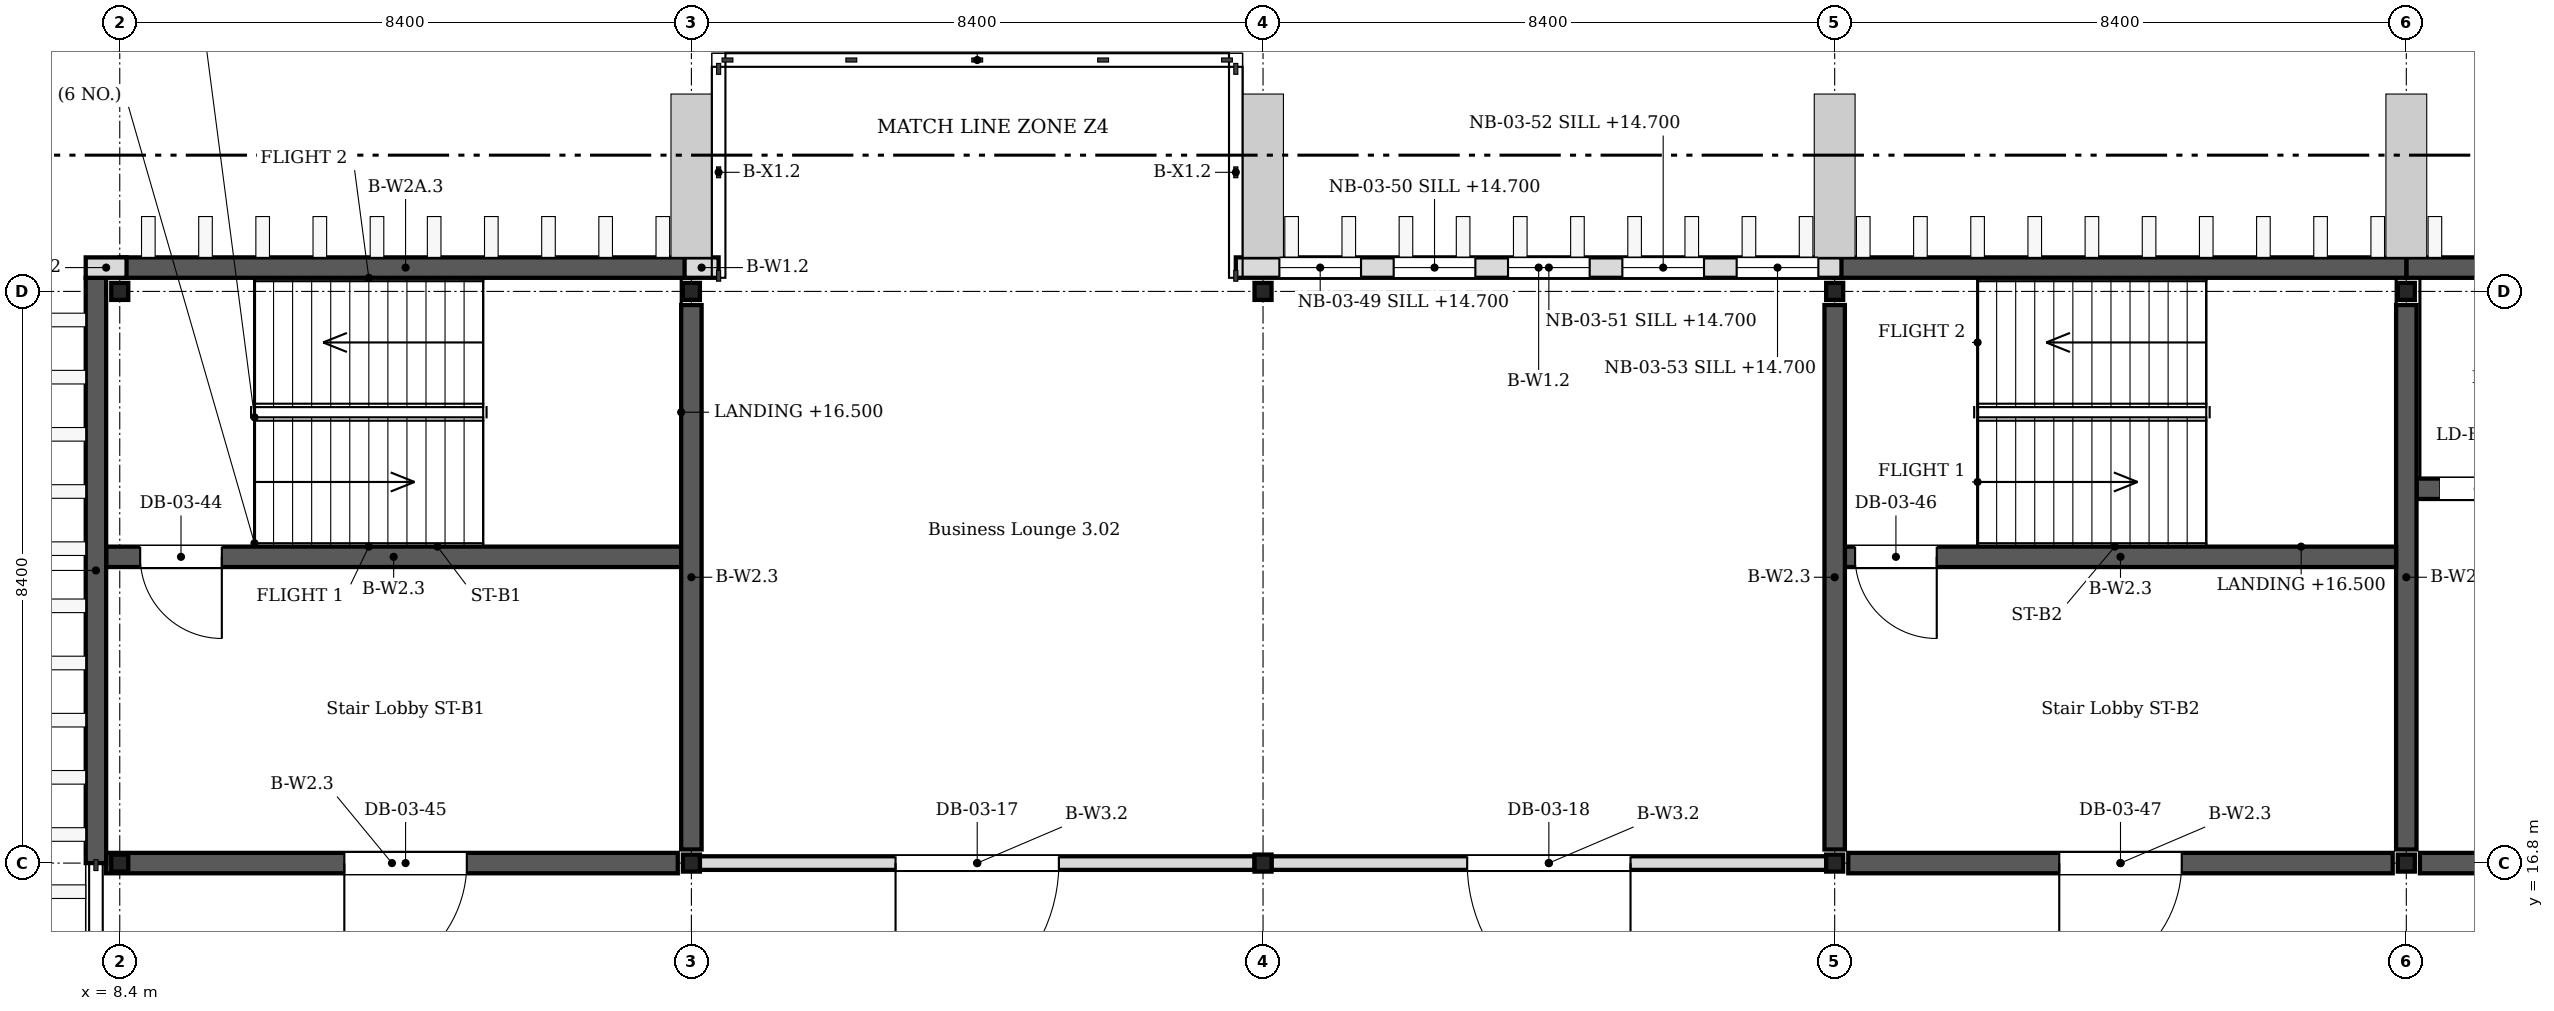
"""IFC4 building model, lengths in metres.
Left out: names, types, materials, properties, quantities, classifications, styles, units other than length and angle.
Written with IfcOpenShell. Run it as: python <this file> out.ifc"""

import sys

from ifc_helpers import new_model, si_unit, direction, frame, frame_2d, origin, origin_2d, place, context, subcontext, project, spatial, rectangle, i_section, extrude, element, fill, save


model = new_model("IFC4")
c1 = context("Model", 3, precision=1e-05, world=origin(), true_north=direction((0.0, 1.0)))
c2 = subcontext(c1, "Body", "Model", "MODEL_VIEW")
j1 = project(units=[si_unit("LENGTHUNIT", "METRE"), si_unit("PLANEANGLEUNIT", "RADIAN")], contexts=[c1])
p1 = place(None, origin())
s1 = spatial("IfcSite", under=j1, at=p1, CompositionType="ELEMENT")
p2 = place(p1, origin())
s2 = spatial("IfcBuilding", under=s1, at=p2, CompositionType="ELEMENT")
p3 = place(p2, frame((0.0, 0.0, 14.4)))
s3 = spatial("IfcBuildingStorey", under=s2, at=p3, CompositionType="ELEMENT", Elevation=14.4)
for number, where, z_axis, x_axis in (
    (1, (8.4, 16.8, 0.0), (0.0, 0.0, 1.0), (1.0, 0.0, 0.0)),
    (2, (8.4, 25.2, 0.0), (0.0, 0.0, 1.0), (1.0, 0.0, 0.0)),
    (3, (16.8, 16.8, 0.0), (0.0, 0.0, 1.0), (1.0, 0.0, 0.0)),
    (4, (16.8, 25.2, 0.0), (0.0, 0.0, 1.0), (1.0, 0.0, 0.0)),
    (5, (25.2, 16.8, 0.0), (0.0, 0.0, 1.0), (1.0, 0.0, 0.0)),
    (6, (25.2, 25.2, 0.0), (0.0, 0.0, 1.0), (1.0, 0.0, 0.0)),
    (7, (33.6, 16.8, 0.0), (0.0, 0.0, 1.0), (1.0, 0.0, 0.0)),
    (8, (33.6, 25.2, 0.0), (0.0, 0.0, 1.0), (1.0, 0.0, 0.0)),
    (9, (42.0, 16.8, 0.0), (0.0, 0.0, 1.0), (1.0, 0.0, 0.0)),
    (10, (42.0, 25.2, 0.0), (0.0, 0.0, 1.0), (1.0, 0.0, 0.0)),
):
    element("IfcColumn", number, at=place(p3, frame(where, z_axis=z_axis, x_axis=x_axis)), inside=s3, PredefinedType="COLUMN", context=c2, shape_type="SweptSolid", body=[
        extrude(i_section(OverallWidth=0.25, OverallDepth=0.25, WebThickness=0.009, FlangeThickness=0.014, FilletRadius=0.013, at=origin_2d()), origin(), (0.0, 0.0, 1.0), 3.95),
    ])
p4 = place(p3, frame((42.0, 17.0, 0.0), z_axis=(0.0, 0.0, 1.0), x_axis=(0.0, 1.0, 0.0)))
e11 = element("IfcWall", 11, at=p4, inside=s3, PredefinedType="SHEAR", context=c2, shape_type="SweptSolid", body=[
    extrude(rectangle(XDim=8.0, YDim=0.3, at=frame_2d((4.0, 0.0))), origin(), (0.0, 0.0, 1.0), 3.95),
])
p5 = place(p3, frame((42.2, 16.8, 0.0), z_axis=(0.0, 0.0, 1.0), x_axis=(1.0, 0.0, 0.0)))
e12 = element("IfcWall", 12, at=p5, inside=s3, PredefinedType="SHEAR", context=c2, shape_type="SweptSolid", body=[
    extrude(rectangle(XDim=8.0, YDim=0.3, at=frame_2d((4.0, 0.0))), origin(), (0.0, 0.0, 1.0), 3.95),
])
p6 = place(p5, frame((3.1, 0.0, 0.0)))
e13 = element("IfcOpeningElement", 13, at=p6, cuts=e12, PredefinedType="OPENING", context=c2, shape_type="SweptSolid", body=[
    extrude(rectangle(XDim=1.8, YDim=2.1, at=frame_2d((0.9, 1.05))), frame((0.0, 0.16, 0.0), z_axis=(0.0, -1.0, 0.0), x_axis=(1.0, 0.0, 0.0)), (0.0, 0.0, 1.0), 0.32),
])
p7 = place(p3, frame((42.15, 22.3, 0.0), z_axis=(0.0, 0.0, 1.0), x_axis=(1.0, 0.0, 0.0)))
e14 = element("IfcWall", 14, at=p7, inside=s3, PredefinedType="SHEAR", context=c2, shape_type="SweptSolid", body=[
    extrude(rectangle(XDim=8.1, YDim=0.3, at=frame_2d((4.05, 0.0))), origin(), (0.0, 0.0, 1.0), 3.95),
])
p8 = place(p7, frame((0.35, 0.0, 0.0)))
e15 = element("IfcOpeningElement", 15, at=p8, cuts=e14, PredefinedType="OPENING", context=c2, shape_type="SweptSolid", body=[
    extrude(rectangle(XDim=1.1, YDim=2.2, at=frame_2d((0.55, 1.1))), frame((0.0, 0.16, 0.0), z_axis=(0.0, -1.0, 0.0), x_axis=(1.0, 0.0, 0.0)), (0.0, 0.0, 1.0), 0.32),
])
p9 = place(p7, frame((6.65, 0.0, 0.0)))
e16 = element("IfcOpeningElement", 16, at=p9, cuts=e14, PredefinedType="OPENING", context=c2, shape_type="SweptSolid", body=[
    extrude(rectangle(XDim=1.1, YDim=2.2, at=frame_2d((0.55, 1.1))), frame((0.0, 0.16, 0.0), z_axis=(0.0, -1.0, 0.0), x_axis=(1.0, 0.0, 0.0)), (0.0, 0.0, 1.0), 0.32),
])
p10 = place(p3, frame((42.0, 25.55, 0.0), z_axis=(0.0, 0.0, 1.0), x_axis=(1.0, 0.0, 0.0)))
e17 = element("IfcWall", 17, at=p10, inside=s3, PredefinedType="SHEAR", context=c2, shape_type="SweptSolid", body=[
    extrude(rectangle(XDim=8.4, YDim=0.3, at=frame_2d((4.2, 0.0))), origin(), (0.0, 0.0, 1.0), 3.95),
])
p11 = place(p3, frame((8.05, 16.8, 0.0), z_axis=(0.0, 0.0, 1.0), x_axis=(0.0, 1.0, 0.0)))
e18 = element("IfcWall", 18, at=p11, inside=s3, PredefinedType="SHEAR", context=c2, shape_type="SweptSolid", body=[
    extrude(rectangle(XDim=8.6, YDim=0.3, at=frame_2d((4.3, 0.0))), origin(), (0.0, 0.0, 1.0), 3.95),
])
p12 = place(p3, frame((16.8, 17.0, 0.0), z_axis=(0.0, 0.0, 1.0), x_axis=(0.0, 1.0, 0.0)))
e19 = element("IfcWall", 19, at=p12, inside=s3, PredefinedType="SHEAR", context=c2, shape_type="SweptSolid", body=[
    extrude(rectangle(XDim=8.0, YDim=0.3, at=frame_2d((4.0, 0.0))), origin(), (0.0, 0.0, 1.0), 3.95),
])
p13 = place(p3, frame((8.2, 16.8, 0.0), z_axis=(0.0, 0.0, 1.0), x_axis=(1.0, 0.0, 0.0)))
e20 = element("IfcWall", 20, at=p13, inside=s3, PredefinedType="SHEAR", context=c2, shape_type="SweptSolid", body=[
    extrude(rectangle(XDim=8.4, YDim=0.3, at=frame_2d((4.2, 0.0))), origin(), (0.0, 0.0, 1.0), 3.95),
])
p14 = place(p13, frame((3.5, 0.0, 0.0)))
e21 = element("IfcOpeningElement", 21, at=p14, cuts=e20, PredefinedType="OPENING", context=c2, shape_type="SweptSolid", body=[
    extrude(rectangle(XDim=1.8, YDim=2.1, at=frame_2d((0.9, 1.05))), frame((0.0, 0.16, 0.0), z_axis=(0.0, -1.0, 0.0), x_axis=(1.0, 0.0, 0.0)), (0.0, 0.0, 1.0), 0.32),
])
p15 = place(p3, frame((8.2, 21.3, 0.0), z_axis=(0.0, 0.0, 1.0), x_axis=(1.0, 0.0, 0.0)))
e22 = element("IfcWall", 22, at=p15, inside=s3, PredefinedType="SHEAR", context=c2, shape_type="SweptSolid", body=[
    extrude(rectangle(XDim=8.45, YDim=0.3, at=frame_2d((4.225, 0.0))), origin(), (0.0, 0.0, 1.0), 3.95),
])
p16 = place(p15, frame((0.5, 0.0, 0.0)))
e23 = element("IfcOpeningElement", 23, at=p16, cuts=e22, PredefinedType="OPENING", context=c2, shape_type="SweptSolid", body=[
    extrude(rectangle(XDim=1.2, YDim=2.1, at=frame_2d((0.6, 1.05))), frame((0.0, 0.16, 0.0), z_axis=(0.0, -1.0, 0.0), x_axis=(1.0, 0.0, 0.0)), (0.0, 0.0, 1.0), 0.32),
])
p17 = place(p3, frame((8.4, 25.55, 0.0), z_axis=(0.0, 0.0, 1.0), x_axis=(1.0, 0.0, 0.0)))
e24 = element("IfcWall", 24, at=p17, inside=s3, PredefinedType="SHEAR", context=c2, shape_type="SweptSolid", body=[
    extrude(rectangle(XDim=8.4, YDim=0.3, at=frame_2d((4.2, 0.0))), origin(), (0.0, 0.0, 1.0), 3.95),
])
p18 = place(p3, frame((33.6, 17.0, 0.0), z_axis=(0.0, 0.0, 1.0), x_axis=(0.0, 1.0, 0.0)))
e25 = element("IfcWall", 25, at=p18, inside=s3, PredefinedType="SHEAR", context=c2, shape_type="SweptSolid", body=[
    extrude(rectangle(XDim=8.0, YDim=0.3, at=frame_2d((4.0, 0.0))), origin(), (0.0, 0.0, 1.0), 3.95),
])
p19 = place(p3, frame((33.8, 16.8, 0.0), z_axis=(0.0, 0.0, 1.0), x_axis=(1.0, 0.0, 0.0)))
e26 = element("IfcWall", 26, at=p19, inside=s3, PredefinedType="SHEAR", context=c2, shape_type="SweptSolid", body=[
    extrude(rectangle(XDim=8.0, YDim=0.3, at=frame_2d((4.0, 0.0))), origin(), (0.0, 0.0, 1.0), 3.95),
])
p20 = place(p19, frame((3.1, 0.0, 0.0)))
e27 = element("IfcOpeningElement", 27, at=p20, cuts=e26, PredefinedType="OPENING", context=c2, shape_type="SweptSolid", body=[
    extrude(rectangle(XDim=1.8, YDim=2.1, at=frame_2d((0.9, 1.05))), frame((0.0, 0.16, 0.0), z_axis=(0.0, -1.0, 0.0), x_axis=(1.0, 0.0, 0.0)), (0.0, 0.0, 1.0), 0.32),
])
p21 = place(p3, frame((33.75, 21.3, 0.0), z_axis=(0.0, 0.0, 1.0), x_axis=(1.0, 0.0, 0.0)))
e28 = element("IfcWall", 28, at=p21, inside=s3, PredefinedType="SHEAR", context=c2, shape_type="SweptSolid", body=[
    extrude(rectangle(XDim=8.1, YDim=0.3, at=frame_2d((4.05, 0.0))), origin(), (0.0, 0.0, 1.0), 3.95),
])
p22 = place(p21, frame((0.15, 0.0, 0.0)))
e29 = element("IfcOpeningElement", 29, at=p22, cuts=e28, PredefinedType="OPENING", context=c2, shape_type="SweptSolid", body=[
    extrude(rectangle(XDim=1.2, YDim=2.1, at=frame_2d((0.6, 1.05))), frame((0.0, 0.16, 0.0), z_axis=(0.0, -1.0, 0.0), x_axis=(1.0, 0.0, 0.0)), (0.0, 0.0, 1.0), 0.32),
])
p23 = place(p3, frame((33.6, 25.55, 0.0), z_axis=(0.0, 0.0, 1.0), x_axis=(1.0, 0.0, 0.0)))
e30 = element("IfcWall", 30, at=p23, inside=s3, PredefinedType="SHEAR", context=c2, shape_type="SweptSolid", body=[
    extrude(rectangle(XDim=8.4, YDim=0.3, at=frame_2d((4.2, 0.0))), origin(), (0.0, 0.0, 1.0), 3.95),
])
p24 = place(p3, frame((7.9, 25.55, 0.0), z_axis=(0.0, 0.0, 1.0), x_axis=(1.0, 0.0, 0.0)))
e31 = element("IfcWall", 31, at=p24, inside=s3, PredefinedType="SOLIDWALL", context=c2, shape_type="SweptSolid", body=[
    extrude(rectangle(XDim=0.6, YDim=0.3, at=frame_2d((0.3, 0.0))), origin(), (0.0, 0.0, 1.0), 3.95),
])
p25 = place(p3, frame((16.7, 25.55, 0.0), z_axis=(0.0, 0.0, 1.0), x_axis=(1.0, 0.0, 0.0)))
e32 = element("IfcWall", 32, at=p25, inside=s3, PredefinedType="SOLIDWALL", context=c2, shape_type="SweptSolid", body=[
    extrude(rectangle(XDim=0.5, YDim=0.3, at=frame_2d((0.25, 0.0))), origin(), (0.0, 0.0, 1.0), 3.95),
])
p26 = place(p3, frame((24.8, 25.55, 0.0), z_axis=(0.0, 0.0, 1.0), x_axis=(1.0, 0.0, 0.0)))
e33 = element("IfcWall", 33, at=p26, inside=s3, PredefinedType="SOLIDWALL", context=c2, shape_type="SweptSolid", body=[
    extrude(rectangle(XDim=8.9, YDim=0.3, at=frame_2d((4.45, 0.0))), origin(), (0.0, 0.0, 1.0), 3.95),
])
p27 = place(p26, frame((0.64, 0.0, 0.3)))
e34 = element("IfcOpeningElement", 34, at=p27, cuts=e33, PredefinedType="OPENING", context=c2, shape_type="SweptSolid", body=[
    extrude(rectangle(XDim=1.2, YDim=3.3, at=frame_2d((0.6, 1.65))), frame((0.0, 0.16, 0.0), z_axis=(0.0, -1.0, 0.0), x_axis=(1.0, 0.0, 0.0)), (0.0, 0.0, 1.0), 0.32),
])
p28 = place(p26, frame((2.32, 0.0, 0.3)))
e35 = element("IfcOpeningElement", 35, at=p28, cuts=e33, PredefinedType="OPENING", context=c2, shape_type="SweptSolid", body=[
    extrude(rectangle(XDim=1.2, YDim=3.3, at=frame_2d((0.6, 1.65))), frame((0.0, 0.16, 0.0), z_axis=(0.0, -1.0, 0.0), x_axis=(1.0, 0.0, 0.0)), (0.0, 0.0, 1.0), 0.32),
])
p29 = place(p26, frame((4.0, 0.0, 0.3)))
e36 = element("IfcOpeningElement", 36, at=p29, cuts=e33, PredefinedType="OPENING", context=c2, shape_type="SweptSolid", body=[
    extrude(rectangle(XDim=1.2, YDim=3.3, at=frame_2d((0.6, 1.65))), frame((0.0, 0.16, 0.0), z_axis=(0.0, -1.0, 0.0), x_axis=(1.0, 0.0, 0.0)), (0.0, 0.0, 1.0), 0.32),
])
p30 = place(p26, frame((5.68, 0.0, 0.3)))
e37 = element("IfcOpeningElement", 37, at=p30, cuts=e33, PredefinedType="OPENING", context=c2, shape_type="SweptSolid", body=[
    extrude(rectangle(XDim=1.2, YDim=3.3, at=frame_2d((0.6, 1.65))), frame((0.0, 0.16, 0.0), z_axis=(0.0, -1.0, 0.0), x_axis=(1.0, 0.0, 0.0)), (0.0, 0.0, 1.0), 0.32),
])
p31 = place(p26, frame((7.36, 0.0, 0.3)))
e38 = element("IfcOpeningElement", 38, at=p31, cuts=e33, PredefinedType="OPENING", context=c2, shape_type="SweptSolid", body=[
    extrude(rectangle(XDim=1.2, YDim=3.3, at=frame_2d((0.6, 1.65))), frame((0.0, 0.16, 0.0), z_axis=(0.0, -1.0, 0.0), x_axis=(1.0, 0.0, 0.0)), (0.0, 0.0, 1.0), 0.32),
])
p32 = place(p3, frame((16.925, 16.8, 0.0), z_axis=(0.0, 0.0, 1.0), x_axis=(1.0, 0.0, 0.0)))
e39 = element("IfcWall", 39, at=p32, inside=s3, PredefinedType="PARTITIONING", context=c2, shape_type="SweptSolid", body=[
    extrude(rectangle(XDim=8.15, YDim=0.2, at=frame_2d((4.075, 0.0))), origin(), (0.0, 0.0, 1.0), 3.25),
])
p33 = place(p32, frame((2.875, 0.0, 0.0)))
e40 = element("IfcOpeningElement", 40, at=p33, cuts=e39, PredefinedType="OPENING", context=c2, shape_type="SweptSolid", body=[
    extrude(rectangle(XDim=2.4, YDim=2.2, at=frame_2d((1.2, 1.1))), frame((0.0, 0.11, 0.0), z_axis=(0.0, -1.0, 0.0), x_axis=(1.0, 0.0, 0.0)), (0.0, 0.0, 1.0), 0.22),
])
p34 = place(p3, frame((25.325, 16.8, 0.0), z_axis=(0.0, 0.0, 1.0), x_axis=(1.0, 0.0, 0.0)))
e41 = element("IfcWall", 41, at=p34, inside=s3, PredefinedType="PARTITIONING", context=c2, shape_type="SweptSolid", body=[
    extrude(rectangle(XDim=8.15, YDim=0.2, at=frame_2d((4.075, 0.0))), origin(), (0.0, 0.0, 1.0), 3.25),
])
p35 = place(p34, frame((2.875, 0.0, 0.0)))
e42 = element("IfcOpeningElement", 42, at=p35, cuts=e41, PredefinedType="OPENING", context=c2, shape_type="SweptSolid", body=[
    extrude(rectangle(XDim=2.4, YDim=2.2, at=frame_2d((1.2, 1.1))), frame((0.0, 0.11, 0.0), z_axis=(0.0, -1.0, 0.0), x_axis=(1.0, 0.0, 0.0)), (0.0, 0.0, 1.0), 0.22),
])
p36 = place(p27, origin())
e43 = element("IfcWindow", 43, at=p36, inside=s3, PartitioningType="TRIPLE_PANEL_VERTICAL", PredefinedType="WINDOW", context=c2, shape_type="SweptSolid", body=[
    extrude(rectangle(XDim=1.2, YDim=3.3, at=frame_2d((0.6, 1.65))), frame((0.0, 0.03, 0.0), z_axis=(0.0, -1.0, 0.0), x_axis=(1.0, 0.0, 0.0)), (0.0, 0.0, 1.0), 0.06),
])
fill(e34, e43)
p37 = place(p28, origin())
e44 = element("IfcWindow", 44, at=p37, inside=s3, PartitioningType="TRIPLE_PANEL_VERTICAL", PredefinedType="WINDOW", context=c2, shape_type="SweptSolid", body=[
    extrude(rectangle(XDim=1.2, YDim=3.3, at=frame_2d((0.6, 1.65))), frame((0.0, 0.03, 0.0), z_axis=(0.0, -1.0, 0.0), x_axis=(1.0, 0.0, 0.0)), (0.0, 0.0, 1.0), 0.06),
])
fill(e35, e44)
p38 = place(p29, origin())
e45 = element("IfcWindow", 45, at=p38, inside=s3, PartitioningType="TRIPLE_PANEL_VERTICAL", PredefinedType="WINDOW", context=c2, shape_type="SweptSolid", body=[
    extrude(rectangle(XDim=1.2, YDim=3.3, at=frame_2d((0.6, 1.65))), frame((0.0, 0.03, 0.0), z_axis=(0.0, -1.0, 0.0), x_axis=(1.0, 0.0, 0.0)), (0.0, 0.0, 1.0), 0.06),
])
fill(e36, e45)
p39 = place(p30, origin())
e46 = element("IfcWindow", 46, at=p39, inside=s3, PartitioningType="TRIPLE_PANEL_VERTICAL", PredefinedType="WINDOW", context=c2, shape_type="SweptSolid", body=[
    extrude(rectangle(XDim=1.2, YDim=3.3, at=frame_2d((0.6, 1.65))), frame((0.0, 0.03, 0.0), z_axis=(0.0, -1.0, 0.0), x_axis=(1.0, 0.0, 0.0)), (0.0, 0.0, 1.0), 0.06),
])
fill(e37, e46)
p40 = place(p31, origin())
e47 = element("IfcWindow", 47, at=p40, inside=s3, PartitioningType="TRIPLE_PANEL_VERTICAL", PredefinedType="WINDOW", context=c2, shape_type="SweptSolid", body=[
    extrude(rectangle(XDim=1.2, YDim=3.3, at=frame_2d((0.6, 1.65))), frame((0.0, 0.03, 0.0), z_axis=(0.0, -1.0, 0.0), x_axis=(1.0, 0.0, 0.0)), (0.0, 0.0, 1.0), 0.06),
])
fill(e38, e47)
p41 = place(p33, origin())
e48 = element("IfcDoor", 48, at=p41, inside=s3, OperationType="DOUBLE_DOOR_SINGLE_SWING", PredefinedType="DOOR", context=c2, shape_type="SweptSolid", body=[
    extrude(rectangle(XDim=2.4, YDim=2.2, at=frame_2d((1.2, 1.1))), frame((0.0, 0.025, 0.0), z_axis=(0.0, -1.0, 0.0), x_axis=(1.0, 0.0, 0.0)), (0.0, 0.0, 1.0), 0.05),
])
fill(e40, e48)
p42 = place(p35, origin())
e49 = element("IfcDoor", 49, at=p42, inside=s3, OperationType="DOUBLE_DOOR_SINGLE_SWING", PredefinedType="DOOR", context=c2, shape_type="SweptSolid", body=[
    extrude(rectangle(XDim=2.4, YDim=2.2, at=frame_2d((1.2, 1.1))), frame((0.0, 0.025, 0.0), z_axis=(0.0, -1.0, 0.0), x_axis=(1.0, 0.0, 0.0)), (0.0, 0.0, 1.0), 0.05),
])
fill(e42, e49)
p43 = place(p8, origin())
e50 = element("IfcDoor", 50, at=p43, inside=s3, OperationType="SLIDING_TO_LEFT", PredefinedType="DOOR", context=c2, shape_type="SweptSolid", body=[
    extrude(rectangle(XDim=1.1, YDim=2.2, at=frame_2d((0.55, 1.1))), frame((0.0, 0.025, 0.0), z_axis=(0.0, -1.0, 0.0), x_axis=(1.0, 0.0, 0.0)), (0.0, 0.0, 1.0), 0.05),
])
fill(e15, e50)
p44 = place(p16, origin())
e51 = element("IfcDoor", 51, at=p44, inside=s3, OperationType="SINGLE_SWING_LEFT", PredefinedType="DOOR", context=c2, shape_type="SweptSolid", body=[
    extrude(rectangle(XDim=1.2, YDim=2.1, at=frame_2d((0.6, 1.05))), frame((0.0, 0.025, 0.0), z_axis=(0.0, -1.0, 0.0), x_axis=(1.0, 0.0, 0.0)), (0.0, 0.0, 1.0), 0.05),
])
fill(e23, e51)
p45 = place(p14, origin())
e52 = element("IfcDoor", 52, at=p45, inside=s3, OperationType="DOUBLE_DOOR_SINGLE_SWING", PredefinedType="DOOR", context=c2, shape_type="SweptSolid", body=[
    extrude(rectangle(XDim=1.8, YDim=2.1, at=frame_2d((0.9, 1.05))), frame((0.0, 0.025, 0.0), z_axis=(0.0, -1.0, 0.0), x_axis=(1.0, 0.0, 0.0)), (0.0, 0.0, 1.0), 0.05),
])
fill(e21, e52)
p46 = place(p22, origin())
e53 = element("IfcDoor", 53, at=p46, inside=s3, OperationType="SINGLE_SWING_LEFT", PredefinedType="DOOR", context=c2, shape_type="SweptSolid", body=[
    extrude(rectangle(XDim=1.2, YDim=2.1, at=frame_2d((0.6, 1.05))), frame((0.0, 0.025, 0.0), z_axis=(0.0, -1.0, 0.0), x_axis=(1.0, 0.0, 0.0)), (0.0, 0.0, 1.0), 0.05),
])
fill(e29, e53)
p47 = place(p20, origin())
e54 = element("IfcDoor", 54, at=p47, inside=s3, OperationType="DOUBLE_DOOR_SINGLE_SWING", PredefinedType="DOOR", context=c2, shape_type="SweptSolid", body=[
    extrude(rectangle(XDim=1.8, YDim=2.1, at=frame_2d((0.9, 1.05))), frame((0.0, 0.025, 0.0), z_axis=(0.0, -1.0, 0.0), x_axis=(1.0, 0.0, 0.0)), (0.0, 0.0, 1.0), 0.05),
])
fill(e27, e54)
save(model, sys.argv[1])
